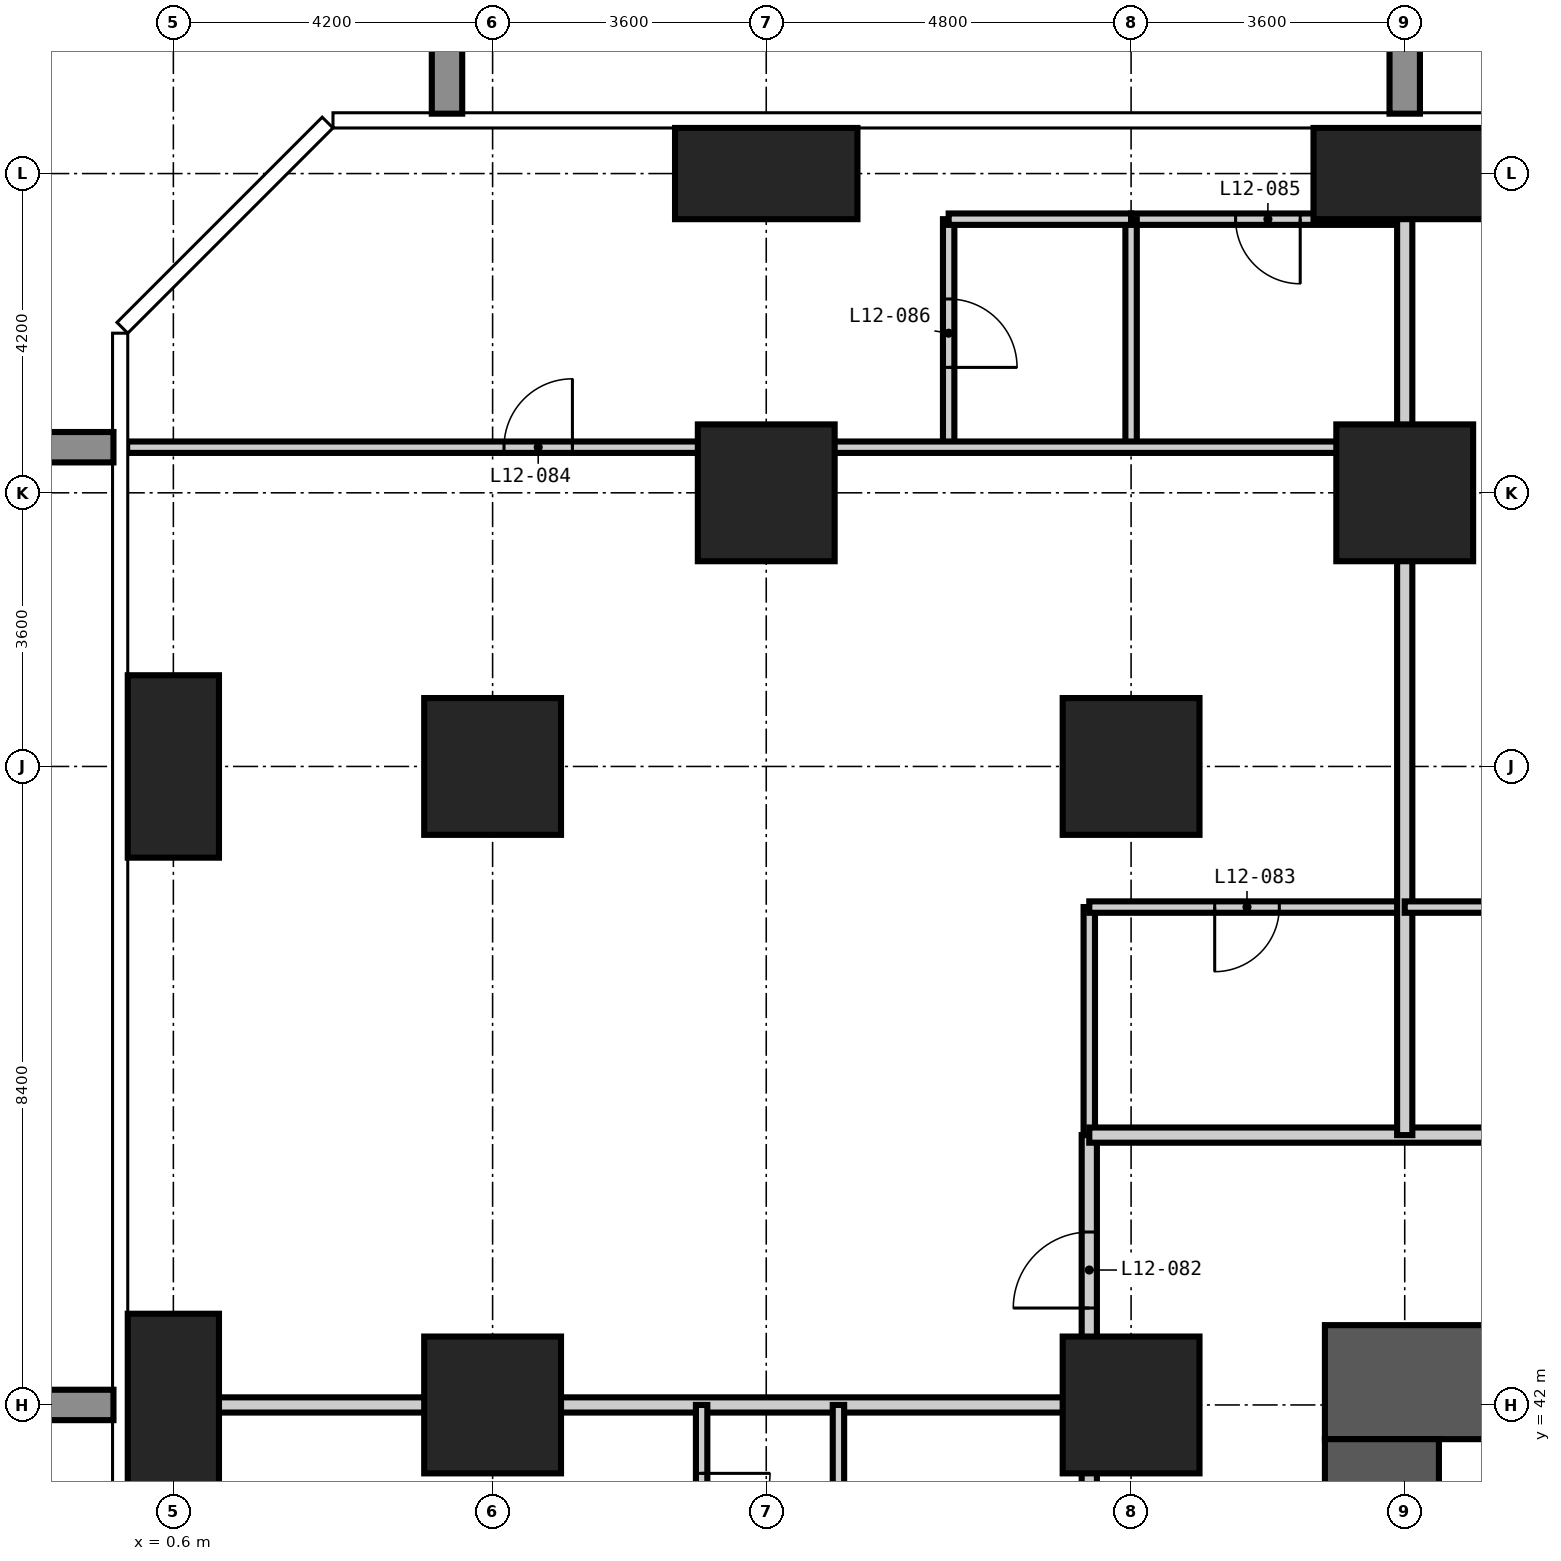
"""IFC4 building model, lengths in metres.
Left out: names, types, materials, properties, quantities, classifications, styles, units other than length and angle.
Written with IfcOpenShell. Run it as: python <this file> out.ifc"""

import sys

from ifc_helpers import new_model, si_unit, direction, frame, frame_2d, origin, origin_2d, place, context, subcontext, project, spatial, rectangle, extrude, element, fill, save


model = new_model("IFC4")
c1 = context("Model", 3, precision=1e-05, world=origin(), true_north=direction((0.0, 1.0)))
c2 = subcontext(c1, "Body", "Model", "MODEL_VIEW")
j1 = project(units=[si_unit("LENGTHUNIT", "METRE"), si_unit("PLANEANGLEUNIT", "RADIAN")], contexts=[c1])
p1 = place(None, origin())
s1 = spatial("IfcSite", under=j1, at=p1, CompositionType="ELEMENT")
p2 = place(p1, origin())
s2 = spatial("IfcBuilding", under=s1, at=p2, CompositionType="ELEMENT")
p3 = place(p2, frame((0.0, 0.0, 52.2)))
s3 = spatial("IfcBuildingStorey", under=s2, at=p3, CompositionType="ELEMENT", Elevation=52.2)
for number, where, z_axis, x_axis in (
    (1, (0.6, 42.0, -0.35), (0.0, 0.0, 1.0), (1.0, 0.0, 0.0)),
    (2, (0.6, 50.4, -0.35), (0.0, 0.0, 1.0), (1.0, 0.0, 0.0)),
):
    element("IfcColumn", number, at=place(p3, frame(where, z_axis=z_axis, x_axis=x_axis)), inside=s3, PredefinedType="COLUMN", context=c2, shape_type="SweptSolid", body=[
        extrude(rectangle(XDim=1.2, YDim=2.4, at=origin_2d()), origin(), (0.0, 0.0, 1.0), 3.6),
    ])
for number, where, z_axis, x_axis in (
    (3, (4.8, 42.0, -0.35), (0.0, 0.0, 1.0), (1.0, 0.0, 0.0)),
    (4, (4.8, 50.4, -0.35), (0.0, 0.0, 1.0), (1.0, 0.0, 0.0)),
    (5, (8.4, 54.0, -0.35), (0.0, 0.0, 1.0), (1.0, 0.0, 0.0)),
):
    element("IfcColumn", number, at=place(p3, frame(where, z_axis=z_axis, x_axis=x_axis)), inside=s3, PredefinedType="COLUMN", context=c2, shape_type="SweptSolid", body=[
        extrude(rectangle(XDim=1.8, YDim=1.8, at=origin_2d()), origin(), (0.0, 0.0, 1.0), 3.6),
    ])
p4 = place(p3, frame((8.4, 58.2, -0.35), z_axis=(0.0, 0.0, 1.0), x_axis=(1.0, 0.0, 0.0)))
e6 = element("IfcColumn", 6, at=p4, inside=s3, PredefinedType="COLUMN", context=c2, shape_type="SweptSolid", body=[
    extrude(rectangle(XDim=2.4, YDim=1.2, at=origin_2d()), origin(), (0.0, 0.0, 1.0), 3.6),
])
for number, where, z_axis, x_axis in (
    (7, (13.2, 42.0, -0.35), (0.0, 0.0, 1.0), (1.0, 0.0, 0.0)),
    (8, (13.2, 50.4, -0.35), (0.0, 0.0, 1.0), (1.0, 0.0, 0.0)),
    (9, (16.8, 54.0, -0.35), (0.0, 0.0, 1.0), (1.0, 0.0, 0.0)),
):
    element("IfcColumn", number, at=place(p3, frame(where, z_axis=z_axis, x_axis=x_axis)), inside=s3, PredefinedType="COLUMN", context=c2, shape_type="SweptSolid", body=[
        extrude(rectangle(XDim=1.8, YDim=1.8, at=origin_2d()), origin(), (0.0, 0.0, 1.0), 3.6),
    ])
p5 = place(p3, frame((16.8, 58.2, -0.35), z_axis=(0.0, 0.0, 1.0), x_axis=(1.0, 0.0, 0.0)))
e10 = element("IfcColumn", 10, at=p5, inside=s3, PredefinedType="COLUMN", context=c2, shape_type="SweptSolid", body=[
    extrude(rectangle(XDim=2.4, YDim=1.2, at=origin_2d()), origin(), (0.0, 0.0, 1.0), 3.6),
])
p6 = place(p3, frame((43.05, 42.3, -0.35), z_axis=(0.0, 0.0, 1.0), x_axis=(-1.0, 0.0, 0.0)))
e11 = element("IfcWall", 11, at=p6, inside=s3, PredefinedType="SHEAR", context=c2, shape_type="SweptSolid", body=[
    extrude(rectangle(XDim=27.3, YDim=1.5, at=frame_2d((13.65, 0.0))), origin(), (0.0, 0.0, 1.0), 3.6),
])
p7 = place(p6, frame((21.55, 0.0, 0.35)))
e12 = element("IfcOpeningElement", 12, at=p7, cuts=e11, PredefinedType="OPENING", context=c2, shape_type="SweptSolid", body=[
    extrude(rectangle(XDim=1.0, YDim=2.1, at=frame_2d((0.5, 1.05))), frame((0.0, 0.76, 0.0), z_axis=(0.0, -1.0, 0.0), x_axis=(1.0, 0.0, 0.0)), (0.0, 0.0, 1.0), 1.52),
])
p8 = place(p6, frame((10.95, 0.0, 0.35)))
e13 = element("IfcOpeningElement", 13, at=p8, cuts=e11, PredefinedType="OPENING", context=c2, shape_type="SweptSolid", body=[
    extrude(rectangle(XDim=1.2, YDim=2.2, at=frame_2d((0.6, 1.1))), frame((0.0, 0.76, 0.0), z_axis=(0.0, -1.0, 0.0), x_axis=(1.0, 0.0, 0.0)), (0.0, 0.0, 1.0), 1.52),
])
p9 = place(p3, frame((16.5, 41.55, -0.35), z_axis=(0.0, 0.0, 1.0), x_axis=(0.0, -1.0, 0.0)))
e14 = element("IfcWall", 14, at=p9, inside=s3, PredefinedType="SHEAR", context=c2, shape_type="SweptSolid", body=[
    extrude(rectangle(XDim=24.3, YDim=1.5, at=frame_2d((12.15, 0.0))), origin(), (0.0, 0.0, 1.0), 3.6),
])
p10 = place(p9, frame((11.25, 0.0, 0.35)))
e15 = element("IfcOpeningElement", 15, at=p10, cuts=e14, PredefinedType="OPENING", context=c2, shape_type="SweptSolid", body=[
    extrude(rectangle(XDim=1.8, YDim=2.2, at=frame_2d((0.9, 1.1))), frame((0.0, 0.76, 0.0), z_axis=(0.0, -1.0, 0.0), x_axis=(1.0, 0.0, 0.0)), (0.0, 0.0, 1.0), 1.52),
])
p11 = place(p9, frame((20.05, 0.0, 0.35)))
e16 = element("IfcOpeningElement", 16, at=p11, cuts=e14, PredefinedType="OPENING", context=c2, shape_type="SweptSolid", body=[
    extrude(rectangle(XDim=1.0, YDim=2.1, at=frame_2d((0.5, 1.05))), frame((0.0, 0.76, 0.0), z_axis=(0.0, -1.0, 0.0), x_axis=(1.0, 0.0, 0.0)), (0.0, 0.0, 1.0), 1.52),
])
p12 = place(p9, frame((5.35, 0.0, 0.35)))
e17 = element("IfcOpeningElement", 17, at=p12, cuts=e14, PredefinedType="OPENING", context=c2, shape_type="SweptSolid", body=[
    extrude(rectangle(XDim=1.0, YDim=2.1, at=frame_2d((0.5, 1.05))), frame((0.0, 0.76, 0.0), z_axis=(0.0, -1.0, 0.0), x_axis=(1.0, 0.0, 0.0)), (0.0, 0.0, 1.0), 1.52),
])
p13 = place(p3, frame((12.65, 45.55, 0.0), z_axis=(0.0, 0.0, 1.0), x_axis=(0.0, 1.0, 0.0)))
e18 = element("IfcWall", 18, at=p13, inside=s3, PredefinedType="PARTITIONING", context=c2, shape_type="SweptSolid", body=[
    extrude(rectangle(XDim=3.0, YDim=0.15, at=frame_2d((1.5, 0.0))), origin(), (0.0, 0.0, 1.0), 3.25),
])
p14 = place(p3, frame((12.65, 48.55, 0.0), z_axis=(0.0, 0.0, 1.0), x_axis=(1.0, 0.0, 0.0)))
e19 = element("IfcWall", 19, at=p14, inside=s3, PredefinedType="PARTITIONING", context=c2, shape_type="SweptSolid", body=[
    extrude(rectangle(XDim=4.15, YDim=0.15, at=frame_2d((2.075, 0.0))), origin(), (0.0, 0.0, 1.0), 3.25),
])
p15 = place(p14, frame((1.65, 0.0, 0.0)))
e20 = element("IfcOpeningElement", 20, at=p15, cuts=e19, PredefinedType="OPENING", context=c2, shape_type="SweptSolid", body=[
    extrude(rectangle(XDim=0.85, YDim=2.1, at=frame_2d((0.425, 1.05))), frame((0.0, 0.085, 0.0), z_axis=(0.0, -1.0, 0.0), x_axis=(1.0, 0.0, 0.0)), (0.0, 0.0, 1.0), 0.17),
])
p16 = place(p3, frame((13.2, 57.6, 0.0), z_axis=(0.0, 0.0, 1.0), x_axis=(1.0, 0.0, 0.0)))
e21 = element("IfcWall", 21, at=p16, inside=s3, PredefinedType="PARTITIONING", context=c2, shape_type="SweptSolid", body=[
    extrude(rectangle(XDim=3.6, YDim=0.15, at=frame_2d((1.8, 0.0))), origin(), (0.0, 0.0, 1.0), 3.25),
])
p17 = place(p16, frame((1.375, 0.0, 0.0)))
e22 = element("IfcOpeningElement", 22, at=p17, cuts=e21, PredefinedType="OPENING", context=c2, shape_type="SweptSolid", body=[
    extrude(rectangle(XDim=0.85, YDim=2.1, at=frame_2d((0.425, 1.05))), frame((0.0, 0.085, 0.0), z_axis=(0.0, -1.0, 0.0), x_axis=(1.0, 0.0, 0.0)), (0.0, 0.0, 1.0), 0.17),
])
p18 = place(p3, frame((12.65, 12.65, 0.0), z_axis=(0.0, 0.0, 1.0), x_axis=(0.0, 1.0, 0.0)))
e23 = element("IfcWall", 23, at=p18, inside=s3, PredefinedType="PARTITIONING", context=c2, shape_type="SweptSolid", body=[
    extrude(rectangle(XDim=32.9, YDim=0.2, at=frame_2d((16.45, 0.0))), origin(), (0.0, 0.0, 1.0), 3.25),
])
p19 = place(p18, frame((8.75, 0.0, 0.0)))
e24 = element("IfcOpeningElement", 24, at=p19, cuts=e23, PredefinedType="OPENING", context=c2, shape_type="SweptSolid", body=[
    extrude(rectangle(XDim=1.0, YDim=2.2, at=frame_2d((0.5, 1.1))), frame((0.0, 0.11, 0.0), z_axis=(0.0, -1.0, 0.0), x_axis=(1.0, 0.0, 0.0)), (0.0, 0.0, 1.0), 0.22),
])
p20 = place(p18, frame((17.0, 0.0, 0.0)))
e25 = element("IfcOpeningElement", 25, at=p20, cuts=e23, PredefinedType="OPENING", context=c2, shape_type="SweptSolid", body=[
    extrude(rectangle(XDim=1.0, YDim=2.2, at=frame_2d((0.5, 1.1))), frame((0.0, 0.11, 0.0), z_axis=(0.0, -1.0, 0.0), x_axis=(1.0, 0.0, 0.0)), (0.0, 0.0, 1.0), 0.22),
])
p21 = place(p18, frame((23.9, 0.0, 0.0)))
e26 = element("IfcOpeningElement", 26, at=p21, cuts=e23, PredefinedType="OPENING", context=c2, shape_type="SweptSolid", body=[
    extrude(rectangle(XDim=1.0, YDim=2.2, at=frame_2d((0.5, 1.1))), frame((0.0, 0.11, 0.0), z_axis=(0.0, -1.0, 0.0), x_axis=(1.0, 0.0, 0.0)), (0.0, 0.0, 1.0), 0.22),
])
p22 = place(p18, frame((25.4, 0.0, 0.0)))
e27 = element("IfcOpeningElement", 27, at=p22, cuts=e23, PredefinedType="OPENING", context=c2, shape_type="SweptSolid", body=[
    extrude(rectangle(XDim=1.0, YDim=2.2, at=frame_2d((0.5, 1.1))), frame((0.0, 0.11, 0.0), z_axis=(0.0, -1.0, 0.0), x_axis=(1.0, 0.0, 0.0)), (0.0, 0.0, 1.0), 0.22),
])
p23 = place(p18, frame((1.575, 0.0, 0.0)))
e28 = element("IfcOpeningElement", 28, at=p23, cuts=e23, PredefinedType="OPENING", context=c2, shape_type="SweptSolid", body=[
    extrude(rectangle(XDim=1.0, YDim=2.2, at=frame_2d((0.5, 1.1))), frame((0.0, 0.11, 0.0), z_axis=(0.0, -1.0, 0.0), x_axis=(1.0, 0.0, 0.0)), (0.0, 0.0, 1.0), 0.22),
])
p24 = place(p18, frame((30.625, 0.0, 0.0)))
e29 = element("IfcOpeningElement", 29, at=p24, cuts=e23, PredefinedType="OPENING", context=c2, shape_type="SweptSolid", body=[
    extrude(rectangle(XDim=1.0, YDim=2.2, at=frame_2d((0.5, 1.1))), frame((0.0, 0.11, 0.0), z_axis=(0.0, -1.0, 0.0), x_axis=(1.0, 0.0, 0.0)), (0.0, 0.0, 1.0), 0.22),
])
p25 = place(p3, frame((12.65, 45.55, 0.0), z_axis=(0.0, 0.0, 1.0), x_axis=(1.0, 0.0, 0.0)))
e30 = element("IfcWall", 30, at=p25, inside=s3, PredefinedType="PARTITIONING", context=c2, shape_type="SweptSolid", body=[
    extrude(rectangle(XDim=32.3, YDim=0.2, at=frame_2d((16.15, 0.0))), origin(), (0.0, 0.0, 1.0), 3.25),
])
p26 = place(p25, frame((6.95, 0.0, 0.0)))
e31 = element("IfcOpeningElement", 31, at=p26, cuts=e30, PredefinedType="OPENING", context=c2, shape_type="SweptSolid", body=[
    extrude(rectangle(XDim=1.0, YDim=2.2, at=frame_2d((0.5, 1.1))), frame((0.0, 0.11, 0.0), z_axis=(0.0, -1.0, 0.0), x_axis=(1.0, 0.0, 0.0)), (0.0, 0.0, 1.0), 0.22),
])
p27 = place(p25, frame((15.35, 0.0, 0.0)))
e32 = element("IfcOpeningElement", 32, at=p27, cuts=e30, PredefinedType="OPENING", context=c2, shape_type="SweptSolid", body=[
    extrude(rectangle(XDim=1.0, YDim=2.2, at=frame_2d((0.5, 1.1))), frame((0.0, 0.11, 0.0), z_axis=(0.0, -1.0, 0.0), x_axis=(1.0, 0.0, 0.0)), (0.0, 0.0, 1.0), 0.22),
])
p28 = place(p25, frame((23.75, 0.0, 0.0)))
e33 = element("IfcOpeningElement", 33, at=p28, cuts=e30, PredefinedType="OPENING", context=c2, shape_type="SweptSolid", body=[
    extrude(rectangle(XDim=1.0, YDim=2.2, at=frame_2d((0.5, 1.1))), frame((0.0, 0.11, 0.0), z_axis=(0.0, -1.0, 0.0), x_axis=(1.0, 0.0, 0.0)), (0.0, 0.0, 1.0), 0.22),
])
p29 = place(p3, frame((16.8, 45.55, 0.0), z_axis=(0.0, 0.0, 1.0), x_axis=(0.0, 1.0, 0.0)))
e34 = element("IfcWall", 34, at=p29, inside=s3, PredefinedType="PARTITIONING", context=c2, shape_type="SweptSolid", body=[
    extrude(rectangle(XDim=13.258, YDim=0.2, at=frame_2d((6.629, 0.0))), origin(), (0.0, 0.0, 1.0), 3.25),
])
p30 = place(p3, frame((-0.008, 42.0, 0.0), z_axis=(0.0, 0.0, 1.0), x_axis=(1.0, 0.0, 0.0)))
e35 = element("IfcWall", 35, at=p30, inside=s3, PredefinedType="PARTITIONING", context=c2, shape_type="SweptSolid", body=[
    extrude(rectangle(XDim=12.658, YDim=0.2, at=frame_2d((6.329, 0.0))), origin(), (0.0, 0.0, 1.0), 3.25),
])
p31 = place(p3, frame((7.55, 39.3, 0.0), z_axis=(0.0, 0.0, 1.0), x_axis=(0.0, 1.0, 0.0)))
e36 = element("IfcWall", 36, at=p31, inside=s3, PredefinedType="PARTITIONING", context=c2, shape_type="SweptSolid", body=[
    extrude(rectangle(XDim=2.7, YDim=0.15, at=frame_2d((1.35, 0.0))), origin(), (0.0, 0.0, 1.0), 3.25),
])
p32 = place(p31, frame((0.9, 0.0, 0.0)))
e37 = element("IfcOpeningElement", 37, at=p32, cuts=e36, PredefinedType="OPENING", context=c2, shape_type="SweptSolid", body=[
    extrude(rectangle(XDim=0.9, YDim=2.1, at=frame_2d((0.45, 1.05))), frame((0.0, 0.085, 0.0), z_axis=(0.0, -1.0, 0.0), x_axis=(1.0, 0.0, 0.0)), (0.0, 0.0, 1.0), 0.17),
])
p33 = place(p3, frame((9.35, 39.3, 0.0), z_axis=(0.0, 0.0, 1.0), x_axis=(0.0, 1.0, 0.0)))
e38 = element("IfcWall", 38, at=p33, inside=s3, PredefinedType="PARTITIONING", context=c2, shape_type="SweptSolid", body=[
    extrude(rectangle(XDim=2.7, YDim=0.15, at=frame_2d((1.35, 0.0))), origin(), (0.0, 0.0, 1.0), 3.25),
])
p34 = place(p3, frame((10.8, 54.6, 0.0), z_axis=(0.0, 0.0, 1.0), x_axis=(0.0, 1.0, 0.0)))
e39 = element("IfcWall", 39, at=p34, inside=s3, PredefinedType="PARTITIONING", context=c2, shape_type="SweptSolid", body=[
    extrude(rectangle(XDim=3.0, YDim=0.15, at=frame_2d((1.5, 0.0))), origin(), (0.0, 0.0, 1.0), 3.25),
])
p35 = place(p34, frame((1.05, 0.0, 0.0)))
e40 = element("IfcOpeningElement", 40, at=p35, cuts=e39, PredefinedType="OPENING", context=c2, shape_type="SweptSolid", body=[
    extrude(rectangle(XDim=0.9, YDim=2.1, at=frame_2d((0.45, 1.05))), frame((0.0, 0.085, 0.0), z_axis=(0.0, -1.0, 0.0), x_axis=(1.0, 0.0, 0.0)), (0.0, 0.0, 1.0), 0.17),
])
p36 = place(p3, frame((13.2, 54.6, 0.0), z_axis=(0.0, 0.0, 1.0), x_axis=(0.0, 1.0, 0.0)))
e41 = element("IfcWall", 41, at=p36, inside=s3, PredefinedType="PARTITIONING", context=c2, shape_type="SweptSolid", body=[
    extrude(rectangle(XDim=3.0, YDim=0.15, at=frame_2d((1.5, 0.0))), origin(), (0.0, 0.0, 1.0), 3.25),
])
p37 = place(p3, frame((16.8, 48.55, 0.0), z_axis=(0.0, 0.0, 1.0), x_axis=(1.0, 0.0, 0.0)))
e42 = element("IfcWall", 42, at=p37, inside=s3, PredefinedType="PARTITIONING", context=c2, shape_type="SweptSolid", body=[
    extrude(rectangle(XDim=2.4, YDim=0.15, at=frame_2d((1.2, 0.0))), origin(), (0.0, 0.0, 1.0), 3.25),
])
p38 = place(p3, frame((-0.008, 54.6, 0.0), z_axis=(0.0, 0.0, 1.0), x_axis=(1.0, 0.0, 0.0)))
e43 = element("IfcWall", 43, at=p38, inside=s3, PredefinedType="PARTITIONING", context=c2, shape_type="SweptSolid", body=[
    extrude(rectangle(XDim=16.808, YDim=0.15, at=frame_2d((8.404, 0.0))), origin(), (0.0, 0.0, 1.0), 3.25),
])
p39 = place(p38, frame((4.958, 0.0, 0.0)))
e44 = element("IfcOpeningElement", 44, at=p39, cuts=e43, PredefinedType="OPENING", context=c2, shape_type="SweptSolid", body=[
    extrude(rectangle(XDim=0.9, YDim=2.1, at=frame_2d((0.45, 1.05))), frame((0.0, 0.085, 0.0), z_axis=(0.0, -1.0, 0.0), x_axis=(1.0, 0.0, 0.0)), (0.0, 0.0, 1.0), 0.17),
])
p40 = place(p3, frame((10.8, 57.6, 0.0), z_axis=(0.0, 0.0, 1.0), x_axis=(1.0, 0.0, 0.0)))
e45 = element("IfcWall", 45, at=p40, inside=s3, PredefinedType="PARTITIONING", context=c2, shape_type="SweptSolid", body=[
    extrude(rectangle(XDim=2.4, YDim=0.15, at=frame_2d((1.2, 0.0))), origin(), (0.0, 0.0, 1.0), 3.25),
])
p41 = place(p32, frame((0.9, 0.0, 0.0), z_axis=(0.0, 0.0, 1.0), x_axis=(-1.0, 0.0, 0.0)))
e46 = element("IfcDoor", 46, at=p41, inside=s3, OperationType="SINGLE_SWING_LEFT", PredefinedType="DOOR", context=c2, shape_type="SweptSolid", body=[
    extrude(rectangle(XDim=0.9, YDim=2.1, at=frame_2d((0.45, 1.05))), frame((0.0, 0.025, 0.0), z_axis=(0.0, -1.0, 0.0), x_axis=(1.0, 0.0, 0.0)), (0.0, 0.0, 1.0), 0.05),
])
fill(e37, e46)
p42 = place(p24, origin())
e47 = element("IfcDoor", 47, at=p42, inside=s3, OperationType="SINGLE_SWING_LEFT", PredefinedType="DOOR", context=c2, shape_type="SweptSolid", body=[
    extrude(rectangle(XDim=1.0, YDim=2.2, at=frame_2d((0.5, 1.1))), frame((0.0, 0.025, 0.0), z_axis=(0.0, -1.0, 0.0), x_axis=(1.0, 0.0, 0.0)), (0.0, 0.0, 1.0), 0.05),
])
fill(e29, e47)
p43 = place(p15, frame((0.85, 0.0, 0.0), z_axis=(0.0, 0.0, 1.0), x_axis=(-1.0, 0.0, 0.0)))
e48 = element("IfcDoor", 48, at=p43, inside=s3, OperationType="SINGLE_SWING_RIGHT", PredefinedType="DOOR", context=c2, shape_type="SweptSolid", body=[
    extrude(rectangle(XDim=0.85, YDim=2.1, at=frame_2d((0.425, 1.05))), frame((0.0, 0.025, 0.0), z_axis=(0.0, -1.0, 0.0), x_axis=(1.0, 0.0, 0.0)), (0.0, 0.0, 1.0), 0.05),
])
fill(e20, e48)
p44 = place(p39, origin())
e49 = element("IfcDoor", 49, at=p44, inside=s3, OperationType="SINGLE_SWING_RIGHT", PredefinedType="DOOR", context=c2, shape_type="SweptSolid", body=[
    extrude(rectangle(XDim=0.9, YDim=2.1, at=frame_2d((0.45, 1.05))), frame((0.0, 0.025, 0.0), z_axis=(0.0, -1.0, 0.0), x_axis=(1.0, 0.0, 0.0)), (0.0, 0.0, 1.0), 0.05),
])
fill(e44, e49)
p45 = place(p17, frame((0.85, 0.0, 0.0), z_axis=(0.0, 0.0, 1.0), x_axis=(-1.0, 0.0, 0.0)))
e50 = element("IfcDoor", 50, at=p45, inside=s3, OperationType="SINGLE_SWING_LEFT", PredefinedType="DOOR", context=c2, shape_type="SweptSolid", body=[
    extrude(rectangle(XDim=0.85, YDim=2.1, at=frame_2d((0.425, 1.05))), frame((0.0, 0.025, 0.0), z_axis=(0.0, -1.0, 0.0), x_axis=(1.0, 0.0, 0.0)), (0.0, 0.0, 1.0), 0.05),
])
fill(e22, e50)
p46 = place(p35, frame((0.9, 0.0, 0.0), z_axis=(0.0, 0.0, 1.0), x_axis=(-1.0, 0.0, 0.0)))
e51 = element("IfcDoor", 51, at=p46, inside=s3, OperationType="SINGLE_SWING_RIGHT", PredefinedType="DOOR", context=c2, shape_type="SweptSolid", body=[
    extrude(rectangle(XDim=0.9, YDim=2.1, at=frame_2d((0.45, 1.05))), frame((0.0, 0.025, 0.0), z_axis=(0.0, -1.0, 0.0), x_axis=(1.0, 0.0, 0.0)), (0.0, 0.0, 1.0), 0.05),
])
fill(e40, e51)
save(model, sys.argv[1])
